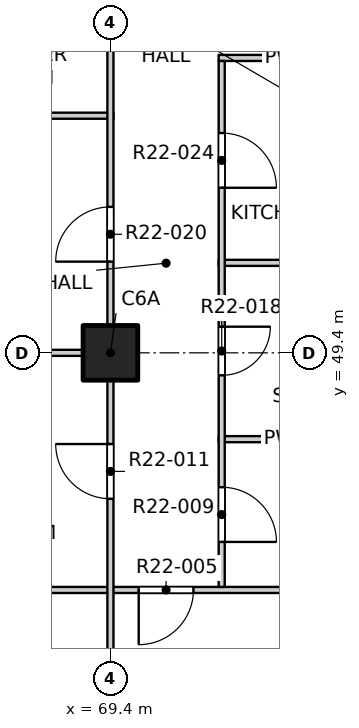
"""IFC4 building model, lengths in metres.
Left out: names, types, materials, properties, quantities, classifications, styles, units other than length and angle.
Written with IfcOpenShell. Run it as: python <this file> out.ifc"""

import sys

from ifc_helpers import new_model, si_unit, direction, frame, frame_2d, origin, origin_2d, place, context, subcontext, project, spatial, rectangle, extrude, element, fill, save


model = new_model("IFC4")
c1 = context("Model", 3, precision=1e-05, world=origin(), true_north=direction((0.0, 1.0)))
c2 = subcontext(c1, "Body", "Model", "MODEL_VIEW")
j1 = project(units=[si_unit("LENGTHUNIT", "METRE"), si_unit("PLANEANGLEUNIT", "RADIAN")], contexts=[c1])
p1 = place(None, origin())
s1 = spatial("IfcSite", under=j1, at=p1, CompositionType="ELEMENT")
p2 = place(p1, origin())
s2 = spatial("IfcBuilding", under=s1, at=p2, CompositionType="ELEMENT")
p3 = place(p2, frame((0.0, 0.0, 231.3)))
s3 = spatial("IfcBuildingStorey", under=s2, at=p3, CompositionType="ELEMENT", Elevation=231.3)
p4 = place(p3, frame((69.4, 49.4, -0.25), z_axis=(0.0, 0.0, 1.0), x_axis=(1.0, 0.0, 0.0)))
e1 = element("IfcColumn", 1, at=p4, inside=s3, PredefinedType="COLUMN", context=c2, shape_type="SweptSolid", body=[
    extrude(rectangle(XDim=0.9, YDim=0.9, at=origin_2d()), origin(), (0.0, 0.0, 1.0), 3.4),
])
p5 = place(p3, frame((61.9, 45.5, 0.0), z_axis=(0.0, 0.0, 1.0), x_axis=(1.0, 0.0, 0.0)))
e2 = element("IfcWall", 2, at=p5, inside=s3, PredefinedType="PARTITIONING", context=c2, shape_type="SweptSolid", body=[
    extrude(rectangle(XDim=11.475, YDim=0.1, at=frame_2d((5.737, 0.0))), origin(), (0.0, 0.0, 1.0), 3.15),
])
p6 = place(p5, frame((7.965, 0.0, 0.0)))
e3 = element("IfcOpeningElement", 3, at=p6, cuts=e2, PredefinedType="OPENING", context=c2, shape_type="SweptSolid", body=[
    extrude(rectangle(XDim=0.9, YDim=2.1, at=frame_2d((0.45, 1.05))), frame((0.0, 0.06, 0.0), z_axis=(0.0, -1.0, 0.0), x_axis=(1.0, 0.0, 0.0)), (0.0, 0.0, 1.0), 0.12),
])
p7 = place(p3, frame((71.18, 47.98, 0.0), z_axis=(0.0, 0.0, 1.0), x_axis=(1.0, 0.0, 0.0)))
e4 = element("IfcWall", 4, at=p7, inside=s3, PredefinedType="PARTITIONING", context=c2, shape_type="SweptSolid", body=[
    extrude(rectangle(XDim=2.195, YDim=0.1, at=frame_2d((1.097, 0.0))), origin(), (0.0, 0.0, 1.0), 3.15),
])
p8 = place(p3, frame((61.9, 49.4, 0.0), z_axis=(0.0, 0.0, 1.0), x_axis=(1.0, 0.0, 0.0)))
e5 = element("IfcWall", 5, at=p8, inside=s3, PredefinedType="PARTITIONING", context=c2, shape_type="SweptSolid", body=[
    extrude(rectangle(XDim=7.55, YDim=0.1, at=frame_2d((3.775, 0.0))), origin(), (0.0, 0.0, 1.0), 3.15),
])
p9 = place(p3, frame((71.18, 50.88, 0.0), z_axis=(0.0, 0.0, 1.0), x_axis=(1.0, 0.0, 0.0)))
e6 = element("IfcWall", 6, at=p9, inside=s3, PredefinedType="PARTITIONING", context=c2, shape_type="SweptSolid", body=[
    extrude(rectangle(XDim=2.22, YDim=0.1, at=frame_2d((1.11, 0.0))), origin(), (0.0, 0.0, 1.0), 3.15),
])
p10 = place(p3, frame((61.9, 53.3, 0.0), z_axis=(0.0, 0.0, 1.0), x_axis=(1.0, 0.0, 0.0)))
e7 = element("IfcWall", 7, at=p10, inside=s3, PredefinedType="PARTITIONING", context=c2, shape_type="SweptSolid", body=[
    extrude(rectangle(XDim=7.55, YDim=0.1, at=frame_2d((3.775, 0.0))), origin(), (0.0, 0.0, 1.0), 3.15),
])
p11 = place(p3, frame((71.18, 54.25, 0.0), z_axis=(0.0, 0.0, 1.0), x_axis=(1.0, 0.0, 0.0)))
e8 = element("IfcWall", 8, at=p11, inside=s3, PredefinedType="PARTITIONING", context=c2, shape_type="SweptSolid", body=[
    extrude(rectangle(XDim=2.22, YDim=0.1, at=frame_2d((1.11, 0.0))), origin(), (0.0, 0.0, 1.0), 3.15),
])
p12 = place(p3, frame((69.4, 41.9, 0.0), z_axis=(0.0, 0.0, 1.0), x_axis=(0.0, 1.0, 0.0)))
e9 = element("IfcWall", 9, at=p12, inside=s3, PredefinedType="PARTITIONING", context=c2, shape_type="SweptSolid", body=[
    extrude(rectangle(XDim=46.2, YDim=0.1, at=frame_2d((23.1, 0.0))), origin(), (0.0, 0.0, 1.0), 3.15),
])
p13 = place(p12, frame((1.2, 0.0, 0.0)))
e10 = element("IfcOpeningElement", 10, at=p13, cuts=e9, PredefinedType="OPENING", context=c2, shape_type="SweptSolid", body=[
    extrude(rectangle(XDim=0.9, YDim=2.1, at=frame_2d((0.45, 1.05))), frame((0.0, 0.06, 0.0), z_axis=(0.0, -1.0, 0.0), x_axis=(1.0, 0.0, 0.0)), (0.0, 0.0, 1.0), 0.12),
])
p14 = place(p12, frame((5.1, 0.0, 0.0)))
e11 = element("IfcOpeningElement", 11, at=p14, cuts=e9, PredefinedType="OPENING", context=c2, shape_type="SweptSolid", body=[
    extrude(rectangle(XDim=0.9, YDim=2.1, at=frame_2d((0.45, 1.05))), frame((0.0, 0.06, 0.0), z_axis=(0.0, -1.0, 0.0), x_axis=(1.0, 0.0, 0.0)), (0.0, 0.0, 1.0), 0.12),
])
p15 = place(p12, frame((9.0, 0.0, 0.0)))
e12 = element("IfcOpeningElement", 12, at=p15, cuts=e9, PredefinedType="OPENING", context=c2, shape_type="SweptSolid", body=[
    extrude(rectangle(XDim=0.9, YDim=2.1, at=frame_2d((0.45, 1.05))), frame((0.0, 0.06, 0.0), z_axis=(0.0, -1.0, 0.0), x_axis=(1.0, 0.0, 0.0)), (0.0, 0.0, 1.0), 0.12),
])
p16 = place(p12, frame((13.85, 0.0, 0.0)))
e13 = element("IfcOpeningElement", 13, at=p16, cuts=e9, PredefinedType="OPENING", context=c2, shape_type="SweptSolid", body=[
    extrude(rectangle(XDim=0.9, YDim=2.1, at=frame_2d((0.45, 1.05))), frame((0.0, 0.06, 0.0), z_axis=(0.0, -1.0, 0.0), x_axis=(1.0, 0.0, 0.0)), (0.0, 0.0, 1.0), 0.12),
])
p17 = place(p12, frame((17.775, 0.0, 0.0)))
e14 = element("IfcOpeningElement", 14, at=p17, cuts=e9, PredefinedType="OPENING", context=c2, shape_type="SweptSolid", body=[
    extrude(rectangle(XDim=0.9, YDim=2.1, at=frame_2d((0.45, 1.05))), frame((0.0, 0.06, 0.0), z_axis=(0.0, -1.0, 0.0), x_axis=(1.0, 0.0, 0.0)), (0.0, 0.0, 1.0), 0.12),
])
p18 = place(p12, frame((21.625, 0.0, 0.0)))
e15 = element("IfcOpeningElement", 15, at=p18, cuts=e9, PredefinedType="OPENING", context=c2, shape_type="SweptSolid", body=[
    extrude(rectangle(XDim=0.9, YDim=2.1, at=frame_2d((0.45, 1.05))), frame((0.0, 0.06, 0.0), z_axis=(0.0, -1.0, 0.0), x_axis=(1.0, 0.0, 0.0)), (0.0, 0.0, 1.0), 0.12),
])
p19 = place(p12, frame((24.6, 0.0, 0.0)))
e16 = element("IfcOpeningElement", 16, at=p19, cuts=e9, PredefinedType="OPENING", context=c2, shape_type="SweptSolid", body=[
    extrude(rectangle(XDim=0.9, YDim=2.1, at=frame_2d((0.45, 1.05))), frame((0.0, 0.06, 0.0), z_axis=(0.0, -1.0, 0.0), x_axis=(1.0, 0.0, 0.0)), (0.0, 0.0, 1.0), 0.12),
])
p20 = place(p12, frame((29.425, 0.0, 0.0)))
e17 = element("IfcOpeningElement", 17, at=p20, cuts=e9, PredefinedType="OPENING", context=c2, shape_type="SweptSolid", body=[
    extrude(rectangle(XDim=0.9, YDim=2.1, at=frame_2d((0.45, 1.05))), frame((0.0, 0.06, 0.0), z_axis=(0.0, -1.0, 0.0), x_axis=(1.0, 0.0, 0.0)), (0.0, 0.0, 1.0), 0.12),
])
p21 = place(p12, frame((33.375, 0.0, 0.0)))
e18 = element("IfcOpeningElement", 18, at=p21, cuts=e9, PredefinedType="OPENING", context=c2, shape_type="SweptSolid", body=[
    extrude(rectangle(XDim=0.9, YDim=2.1, at=frame_2d((0.45, 1.05))), frame((0.0, 0.06, 0.0), z_axis=(0.0, -1.0, 0.0), x_axis=(1.0, 0.0, 0.0)), (0.0, 0.0, 1.0), 0.12),
])
p22 = place(p12, frame((36.3, 0.0, 0.0)))
e19 = element("IfcOpeningElement", 19, at=p22, cuts=e9, PredefinedType="OPENING", context=c2, shape_type="SweptSolid", body=[
    extrude(rectangle(XDim=0.9, YDim=2.1, at=frame_2d((0.45, 1.05))), frame((0.0, 0.06, 0.0), z_axis=(0.0, -1.0, 0.0), x_axis=(1.0, 0.0, 0.0)), (0.0, 0.0, 1.0), 0.12),
])
p23 = place(p12, frame((41.175, 0.0, 0.0)))
e20 = element("IfcOpeningElement", 20, at=p23, cuts=e9, PredefinedType="OPENING", context=c2, shape_type="SweptSolid", body=[
    extrude(rectangle(XDim=0.9, YDim=2.1, at=frame_2d((0.45, 1.05))), frame((0.0, 0.06, 0.0), z_axis=(0.0, -1.0, 0.0), x_axis=(1.0, 0.0, 0.0)), (0.0, 0.0, 1.0), 0.12),
])
p24 = place(p12, frame((44.1, 0.0, 0.0)))
e21 = element("IfcOpeningElement", 21, at=p24, cuts=e9, PredefinedType="OPENING", context=c2, shape_type="SweptSolid", body=[
    extrude(rectangle(XDim=0.9, YDim=2.1, at=frame_2d((0.45, 1.05))), frame((0.0, 0.06, 0.0), z_axis=(0.0, -1.0, 0.0), x_axis=(1.0, 0.0, 0.0)), (0.0, 0.0, 1.0), 0.12),
])
p25 = place(p3, frame((71.23, 45.55, 0.0), z_axis=(0.0, 0.0, 1.0), x_axis=(0.0, 1.0, 0.0)))
e22 = element("IfcWall", 22, at=p25, inside=s3, PredefinedType="PARTITIONING", context=c2, shape_type="SweptSolid", body=[
    extrude(rectangle(XDim=8.65, YDim=0.1, at=frame_2d((4.325, 0.0))), origin(), (0.0, 0.0, 1.0), 3.15),
])
p26 = place(p25, frame((0.74, 0.0, 0.0)))
e23 = element("IfcOpeningElement", 23, at=p26, cuts=e22, PredefinedType="OPENING", context=c2, shape_type="SweptSolid", body=[
    extrude(rectangle(XDim=0.9, YDim=2.1, at=frame_2d((0.45, 1.05))), frame((0.0, 0.06, 0.0), z_axis=(0.0, -1.0, 0.0), x_axis=(1.0, 0.0, 0.0)), (0.0, 0.0, 1.0), 0.12),
])
p27 = place(p25, frame((3.48, 0.0, 0.0)))
e24 = element("IfcOpeningElement", 24, at=p27, cuts=e22, PredefinedType="OPENING", context=c2, shape_type="SweptSolid", body=[
    extrude(rectangle(XDim=0.8, YDim=2.1, at=frame_2d((0.4, 1.05))), frame((0.0, 0.06, 0.0), z_axis=(0.0, -1.0, 0.0), x_axis=(1.0, 0.0, 0.0)), (0.0, 0.0, 1.0), 0.12),
])
p28 = place(p25, frame((6.565, 0.0, 0.0)))
e25 = element("IfcOpeningElement", 25, at=p28, cuts=e22, PredefinedType="OPENING", context=c2, shape_type="SweptSolid", body=[
    extrude(rectangle(XDim=0.9, YDim=2.1, at=frame_2d((0.45, 1.05))), frame((0.0, 0.06, 0.0), z_axis=(0.0, -1.0, 0.0), x_axis=(1.0, 0.0, 0.0)), (0.0, 0.0, 1.0), 0.12),
])
p29 = place(p6, origin())
e26 = element("IfcDoor", 26, at=p29, inside=s3, OperationType="SINGLE_SWING_RIGHT", PredefinedType="DOOR", context=c2, shape_type="SweptSolid", body=[
    extrude(rectangle(XDim=0.9, YDim=2.1, at=frame_2d((0.45, 1.05))), frame((0.0, 0.025, 0.0), z_axis=(0.0, -1.0, 0.0), x_axis=(1.0, 0.0, 0.0)), (0.0, 0.0, 1.0), 0.05),
])
fill(e3, e26)
p30 = place(p26, origin())
e27 = element("IfcDoor", 27, at=p30, inside=s3, OperationType="SINGLE_SWING_RIGHT", PredefinedType="DOOR", context=c2, shape_type="SweptSolid", body=[
    extrude(rectangle(XDim=0.9, YDim=2.1, at=frame_2d((0.45, 1.05))), frame((0.0, 0.025, 0.0), z_axis=(0.0, -1.0, 0.0), x_axis=(1.0, 0.0, 0.0)), (0.0, 0.0, 1.0), 0.05),
])
fill(e23, e27)
p31 = place(p14, origin())
e28 = element("IfcDoor", 28, at=p31, inside=s3, OperationType="SINGLE_SWING_RIGHT", PredefinedType="DOOR", context=c2, shape_type="SweptSolid", body=[
    extrude(rectangle(XDim=0.9, YDim=2.1, at=frame_2d((0.45, 1.05))), frame((0.0, 0.025, 0.0), z_axis=(0.0, -1.0, 0.0), x_axis=(1.0, 0.0, 0.0)), (0.0, 0.0, 1.0), 0.05),
])
fill(e11, e28)
p32 = place(p27, origin())
e29 = element("IfcDoor", 29, at=p32, inside=s3, OperationType="SINGLE_SWING_LEFT", PredefinedType="DOOR", context=c2, shape_type="SweptSolid", body=[
    extrude(rectangle(XDim=0.8, YDim=2.1, at=frame_2d((0.4, 1.05))), frame((0.0, 0.025, 0.0), z_axis=(0.0, -1.0, 0.0), x_axis=(1.0, 0.0, 0.0)), (0.0, 0.0, 1.0), 0.05),
])
fill(e24, e29)
p33 = place(p15, origin())
e30 = element("IfcDoor", 30, at=p33, inside=s3, OperationType="SINGLE_SWING_LEFT", PredefinedType="DOOR", context=c2, shape_type="SweptSolid", body=[
    extrude(rectangle(XDim=0.9, YDim=2.1, at=frame_2d((0.45, 1.05))), frame((0.0, 0.025, 0.0), z_axis=(0.0, -1.0, 0.0), x_axis=(1.0, 0.0, 0.0)), (0.0, 0.0, 1.0), 0.05),
])
fill(e12, e30)
p34 = place(p28, origin())
e31 = element("IfcDoor", 31, at=p34, inside=s3, OperationType="SINGLE_SWING_RIGHT", PredefinedType="DOOR", context=c2, shape_type="SweptSolid", body=[
    extrude(rectangle(XDim=0.9, YDim=2.1, at=frame_2d((0.45, 1.05))), frame((0.0, 0.025, 0.0), z_axis=(0.0, -1.0, 0.0), x_axis=(1.0, 0.0, 0.0)), (0.0, 0.0, 1.0), 0.05),
])
fill(e25, e31)
save(model, sys.argv[1])
